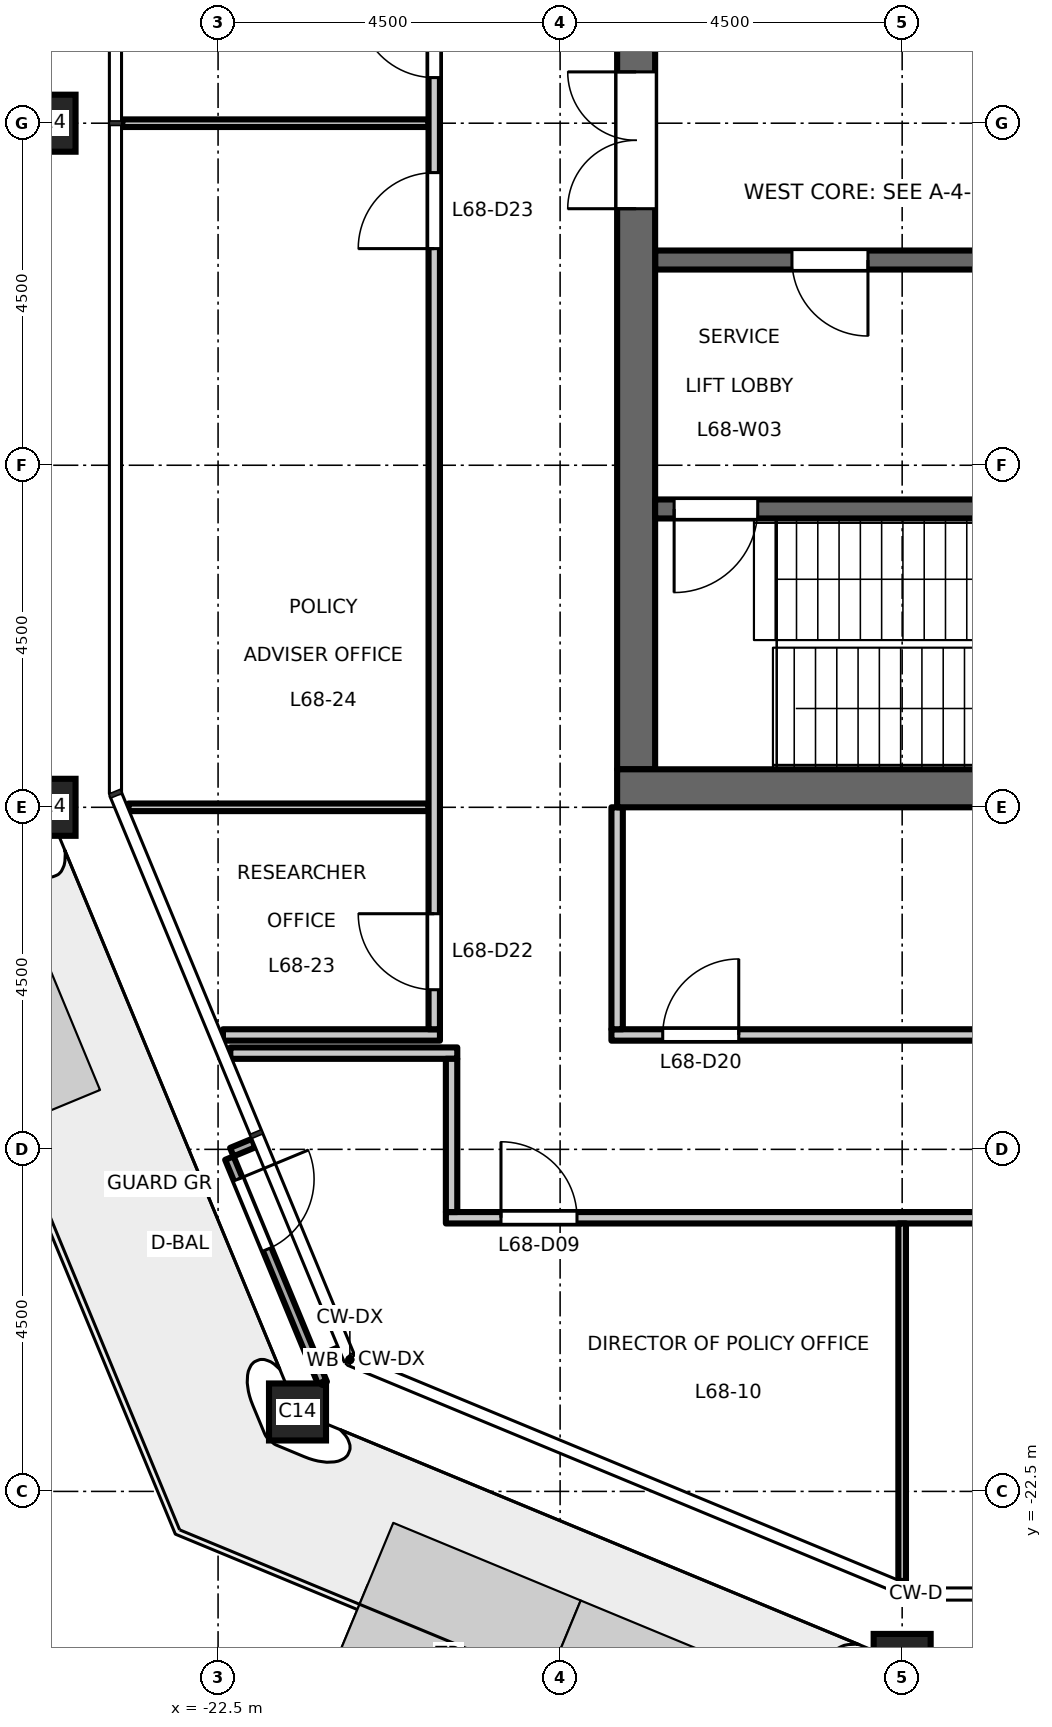
"""IFC4 building model, lengths in metres.
Left out: names, types, materials, properties, quantities, classifications, styles, units other than length and angle.
Written with IfcOpenShell. Run it as: python <this file> out.ifc"""

import sys

from ifc_helpers import new_model, si_unit, direction, frame, frame_2d, origin, origin_2d, place, context, subcontext, project, spatial, rectangle, hollow_rectangle, extrude, element, fill, save


model = new_model("IFC4")
c1 = context("Model", 3, precision=1e-05, world=origin(), true_north=direction((0.0, 1.0)))
c2 = subcontext(c1, "Body", "Model", "MODEL_VIEW")
j1 = project(units=[si_unit("LENGTHUNIT", "METRE"), si_unit("PLANEANGLEUNIT", "RADIAN")], contexts=[c1])
p1 = place(None, origin())
s1 = spatial("IfcSite", under=j1, at=p1, CompositionType="ELEMENT")
p2 = place(p1, origin())
s2 = spatial("IfcBuilding", under=s1, at=p2, CompositionType="ELEMENT")
p3 = place(p2, frame((0.0, 0.0, 316.7)))
s3 = spatial("IfcBuildingStorey", under=s2, at=p3, CompositionType="ELEMENT", Elevation=316.7)
for number, where, z_axis, x_axis in (
    (1, (-13.5, -24.75, 0.0), (0.0, 0.0, 1.0), (1.0, 0.0, 0.0)),
    (2, (-24.75, -4.5, 0.0), (0.0, 0.0, 1.0), (1.0, 0.0, 0.0)),
    (3, (-24.75, -13.5, 0.0), (0.0, 0.0, 1.0), (1.0, 0.0, 0.0)),
    (4, (-21.455, -21.455, 0.0), (0.0, 0.0, 1.0), (1.0, 0.0, 0.0)),
):
    element("IfcColumn", number, at=place(p3, frame(where, z_axis=z_axis, x_axis=x_axis)), inside=s3, PredefinedType="COLUMN", context=c2, shape_type="SweptSolid", body=[
        extrude(hollow_rectangle(XDim=0.75, YDim=0.75, WallThickness=0.04, at=origin_2d()), origin(), (0.0, 0.0, 1.0), 4.5),
    ])
p4 = place(p3, frame((-12.15, -6.3, 0.0), z_axis=(0.0, 0.0, 1.0), x_axis=(-1.0, 0.0, 0.0)))
e5 = element("IfcWall", 5, at=p4, inside=s3, PredefinedType="SHEAR", context=c2, shape_type="SweptSolid", body=[
    extrude(rectangle(XDim=4.6, YDim=0.25, at=frame_2d((2.3, 0.0))), origin(), (0.0, 0.0, 1.0), 4.35),
])
p5 = place(p4, frame((1.8, 0.0, 0.0)))
e6 = element("IfcOpeningElement", 6, at=p5, cuts=e5, PredefinedType="OPENING", context=c2, shape_type="SweptSolid", body=[
    extrude(rectangle(XDim=1.0, YDim=2.1, at=frame_2d((0.5, 1.05))), frame((0.0, 0.135, 0.0), z_axis=(0.0, -1.0, 0.0), x_axis=(1.0, 0.0, 0.0)), (0.0, 0.0, 1.0), 0.27),
])
p6 = place(p3, frame((-17.0, -13.0, 0.0), z_axis=(0.0, 0.0, 1.0), x_axis=(0.0, 1.0, 0.0)))
e7 = element("IfcWall", 7, at=p6, inside=s3, PredefinedType="SHEAR", context=c2, shape_type="SweptSolid", body=[
    extrude(rectangle(XDim=26.0, YDim=0.5, at=frame_2d((13.0, 0.0))), origin(), (0.0, 0.0, 1.0), 4.35),
])
p7 = place(p6, frame((16.825, 0.0, 0.0)))
e8 = element("IfcOpeningElement", 8, at=p7, cuts=e7, PredefinedType="OPENING", context=c2, shape_type="SweptSolid", body=[
    extrude(rectangle(XDim=1.8, YDim=2.1, at=frame_2d((0.9, 1.05))), frame((0.0, 0.26, 0.0), z_axis=(0.0, -1.0, 0.0), x_axis=(1.0, 0.0, 0.0)), (0.0, 0.0, 1.0), 0.52),
])
p8 = place(p6, frame((7.375, 0.0, 0.0)))
e9 = element("IfcOpeningElement", 9, at=p8, cuts=e7, PredefinedType="OPENING", context=c2, shape_type="SweptSolid", body=[
    extrude(rectangle(XDim=1.8, YDim=2.1, at=frame_2d((0.9, 1.05))), frame((0.0, 0.26, 0.0), z_axis=(0.0, -1.0, 0.0), x_axis=(1.0, 0.0, 0.0)), (0.0, 0.0, 1.0), 0.52),
])
p9 = place(p3, frame((-8.75, -9.575, 0.0), z_axis=(0.0, 0.0, 1.0), x_axis=(-1.0, 0.0, 0.0)))
e10 = element("IfcWall", 10, at=p9, inside=s3, PredefinedType="SHEAR", context=c2, shape_type="SweptSolid", body=[
    extrude(rectangle(XDim=8.0, YDim=0.25, at=frame_2d((4.0, 0.0))), origin(), (0.0, 0.0, 1.0), 4.35),
])
p10 = place(p9, frame((6.65, 0.0, 0.0)))
e11 = element("IfcOpeningElement", 11, at=p10, cuts=e10, PredefinedType="OPENING", context=c2, shape_type="SweptSolid", body=[
    extrude(rectangle(XDim=1.1, YDim=2.1, at=frame_2d((0.55, 1.05))), frame((0.0, 0.135, 0.0), z_axis=(0.0, -1.0, 0.0), x_axis=(1.0, 0.0, 0.0)), (0.0, 0.0, 1.0), 0.27),
])
p11 = place(p3, frame((-8.25, -13.25, 0.0), z_axis=(0.0, 0.0, 1.0), x_axis=(-1.0, 0.0, 0.0)))
e12 = element("IfcWall", 12, at=p11, inside=s3, PredefinedType="SHEAR", context=c2, shape_type="SweptSolid", body=[
    extrude(rectangle(XDim=9.0, YDim=0.5, at=frame_2d((4.5, 0.0))), origin(), (0.0, 0.0, 1.0), 4.35),
])
p12 = place(p3, frame((-22.033, -17.917, 0.0), z_axis=(0.0, 0.0, 1.0), x_axis=(-0.923844027884, -0.382769136873, 0.0)))
e13 = element("IfcWall", 13, at=p12, inside=s3, PredefinedType="STANDARD", context=c2, shape_type="SweptSolid", body=[
    extrude(rectangle(XDim=0.31, YDim=0.12, at=frame_2d((0.155, 0.0))), origin(), (0.0, 0.0, 1.0), 4.35),
])
p13 = place(p3, frame((-20.896, -20.66, 0.0), z_axis=(0.0, 0.0, 1.0), x_axis=(-0.923959293734, -0.382490814953, 0.0)))
e14 = element("IfcWall", 14, at=p13, inside=s3, PredefinedType="STANDARD", context=c2, shape_type="SweptSolid", body=[
    extrude(rectangle(XDim=0.31, YDim=0.12, at=frame_2d((0.155, 0.0))), origin(), (0.0, 0.0, 1.0), 4.35),
])
p14 = place(p3, frame((-22.352, -18.115, 0.0), z_axis=(0.0, 0.0, 1.0), x_axis=(0.382680969843, -0.923880552517, 0.0)))
e15 = element("IfcWall", 15, at=p14, inside=s3, PredefinedType="STANDARD", context=c2, shape_type="SweptSolid", body=[
    extrude(rectangle(XDim=3.21, YDim=0.12, at=frame_2d((1.605, 0.0))), origin(), (0.0, 0.0, 1.0), 4.35),
])
p15 = place(p14, frame((0.3, 0.0, 0.0)))
e16 = element("IfcOpeningElement", 16, at=p15, cuts=e15, PredefinedType="OPENING", context=c2, shape_type="SweptSolid", body=[
    extrude(rectangle(XDim=1.0, YDim=2.4, at=frame_2d((0.5, 1.2))), frame((0.0, 0.07, 0.0), z_axis=(0.0, -1.0, 0.0), x_axis=(1.0, 0.0, 0.0)), (0.0, 0.0, 1.0), 0.14),
])
p16 = place(p3, frame((-19.503, -18.9, 0.0), z_axis=(0.0, 0.0, 1.0), x_axis=(1.0, 0.0, 0.0)))
e17 = element("IfcWall", 17, at=p16, inside=s3, PredefinedType="PARTITIONING", context=c2, shape_type="SweptSolid", body=[
    extrude(rectangle(XDim=40.944, YDim=0.15, at=frame_2d((20.472, 0.0))), origin(), (0.0, 0.0, 1.0), 4.35),
])
p17 = place(p16, frame((13.403, 0.0, 0.0)))
e18 = element("IfcOpeningElement", 18, at=p17, cuts=e17, PredefinedType="OPENING", context=c2, shape_type="SweptSolid", body=[
    extrude(rectangle(XDim=1.0, YDim=2.1, at=frame_2d((0.5, 1.05))), frame((0.0, 0.085, 0.0), z_axis=(0.0, -1.0, 0.0), x_axis=(1.0, 0.0, 0.0)), (0.0, 0.0, 1.0), 0.17),
])
p18 = place(p16, frame((15.653, 0.0, 0.0)))
e19 = element("IfcOpeningElement", 19, at=p18, cuts=e17, PredefinedType="OPENING", context=c2, shape_type="SweptSolid", body=[
    extrude(rectangle(XDim=1.0, YDim=2.1, at=frame_2d((0.5, 1.05))), frame((0.0, 0.085, 0.0), z_axis=(0.0, -1.0, 0.0), x_axis=(1.0, 0.0, 0.0)), (0.0, 0.0, 1.0), 0.17),
])
p19 = place(p16, frame((31.403, 0.0, 0.0)))
e20 = element("IfcOpeningElement", 20, at=p19, cuts=e17, PredefinedType="OPENING", context=c2, shape_type="SweptSolid", body=[
    extrude(rectangle(XDim=1.0, YDim=2.1, at=frame_2d((0.5, 1.05))), frame((0.0, 0.085, 0.0), z_axis=(0.0, -1.0, 0.0), x_axis=(1.0, 0.0, 0.0)), (0.0, 0.0, 1.0), 0.17),
])
p20 = place(p16, frame((0.725, 0.0, 0.0)))
e21 = element("IfcOpeningElement", 21, at=p20, cuts=e17, PredefinedType="OPENING", context=c2, shape_type="SweptSolid", body=[
    extrude(rectangle(XDim=1.0, YDim=2.1, at=frame_2d((0.5, 1.05))), frame((0.0, 0.085, 0.0), z_axis=(0.0, -1.0, 0.0), x_axis=(1.0, 0.0, 0.0)), (0.0, 0.0, 1.0), 0.17),
])
p21 = place(p16, frame((39.403, 0.0, 0.0)))
e22 = element("IfcOpeningElement", 22, at=p21, cuts=e17, PredefinedType="OPENING", context=c2, shape_type="SweptSolid", body=[
    extrude(rectangle(XDim=1.0, YDim=2.1, at=frame_2d((0.5, 1.05))), frame((0.0, 0.085, 0.0), z_axis=(0.0, -1.0, 0.0), x_axis=(1.0, 0.0, 0.0)), (0.0, 0.0, 1.0), 0.17),
])
p22 = place(p3, frame((-22.339, -16.734, 0.0), z_axis=(0.0, 0.0, 1.0), x_axis=(1.0, 0.0, 0.0)))
e23 = element("IfcWall", 23, at=p22, inside=s3, PredefinedType="PARTITIONING", context=c2, shape_type="SweptSolid", body=[
    extrude(rectangle(XDim=2.986, YDim=0.15, at=frame_2d((1.493, 0.0))), origin(), (0.0, 0.0, 1.0), 4.35),
])
p23 = place(p3, frame((-22.436, -16.495, 0.0), z_axis=(0.0, 0.0, 1.0), x_axis=(1.0, 0.0, 0.0)))
e24 = element("IfcWall", 24, at=p23, inside=s3, PredefinedType="PARTITIONING", context=c2, shape_type="SweptSolid", body=[
    extrude(rectangle(XDim=2.855, YDim=0.15, at=frame_2d((1.427, 0.0))), origin(), (0.0, 0.0, 1.0), 4.35),
])
p24 = place(p3, frame((-17.325, -16.495, 0.0), z_axis=(0.0, 0.0, 1.0), x_axis=(1.0, 0.0, 0.0)))
e25 = element("IfcWall", 25, at=p24, inside=s3, PredefinedType="PARTITIONING", context=c2, shape_type="SweptSolid", body=[
    extrude(rectangle(XDim=34.65, YDim=0.15, at=frame_2d((17.325, 0.0))), origin(), (0.0, 0.0, 1.0), 4.35),
])
p25 = place(p24, frame((9.675, 0.0, 0.0)))
e26 = element("IfcOpeningElement", 26, at=p25, cuts=e25, PredefinedType="OPENING", context=c2, shape_type="SweptSolid", body=[
    extrude(rectangle(XDim=1.0, YDim=2.1, at=frame_2d((0.5, 1.05))), frame((0.0, 0.085, 0.0), z_axis=(0.0, -1.0, 0.0), x_axis=(1.0, 0.0, 0.0)), (0.0, 0.0, 1.0), 0.17),
])
p26 = place(p24, frame((23.925, 0.0, 0.0)))
e27 = element("IfcOpeningElement", 27, at=p26, cuts=e25, PredefinedType="OPENING", context=c2, shape_type="SweptSolid", body=[
    extrude(rectangle(XDim=1.0, YDim=2.1, at=frame_2d((0.5, 1.05))), frame((0.0, 0.085, 0.0), z_axis=(0.0, -1.0, 0.0), x_axis=(1.0, 0.0, 0.0)), (0.0, 0.0, 1.0), 0.17),
])
p27 = place(p24, frame((0.675, 0.0, 0.0)))
e28 = element("IfcOpeningElement", 28, at=p27, cuts=e25, PredefinedType="OPENING", context=c2, shape_type="SweptSolid", body=[
    extrude(rectangle(XDim=1.0, YDim=2.1, at=frame_2d((0.5, 1.05))), frame((0.0, 0.085, 0.0), z_axis=(0.0, -1.0, 0.0), x_axis=(1.0, 0.0, 0.0)), (0.0, 0.0, 1.0), 0.17),
])
p28 = place(p24, frame((32.925, 0.0, 0.0)))
e29 = element("IfcOpeningElement", 29, at=p28, cuts=e25, PredefinedType="OPENING", context=c2, shape_type="SweptSolid", body=[
    extrude(rectangle(XDim=1.0, YDim=2.1, at=frame_2d((0.5, 1.05))), frame((0.0, 0.085, 0.0), z_axis=(0.0, -1.0, 0.0), x_axis=(1.0, 0.0, 0.0)), (0.0, 0.0, 1.0), 0.17),
])
p29 = place(p3, frame((-23.678, -13.5, 0.0), z_axis=(0.0, 0.0, 1.0), x_axis=(1.0, 0.0, 0.0)))
e30 = element("IfcWall", 30, at=p29, inside=s3, PredefinedType="PARTITIONING", context=c2, shape_type="SweptSolid", body=[
    extrude(rectangle(XDim=3.947, YDim=0.1, at=frame_2d((1.974, 0.0))), origin(), (0.0, 0.0, 1.0), 4.35),
])
p30 = place(p3, frame((-23.76, -4.5, 0.0), z_axis=(0.0, 0.0, 1.0), x_axis=(1.0, 0.0, 0.0)))
e31 = element("IfcWall", 31, at=p30, inside=s3, PredefinedType="PARTITIONING", context=c2, shape_type="SweptSolid", body=[
    extrude(rectangle(XDim=4.029, YDim=0.1, at=frame_2d((2.015, 0.0))), origin(), (0.0, 0.0, 1.0), 4.35),
])
p31 = place(p3, frame((-19.656, -16.42, 0.0), z_axis=(0.0, 0.0, 1.0), x_axis=(0.0, 1.0, 0.0)))
e32 = element("IfcWall", 32, at=p31, inside=s3, PredefinedType="PARTITIONING", context=c2, shape_type="SweptSolid", body=[
    extrude(rectangle(XDim=32.845, YDim=0.15, at=frame_2d((16.422, 0.0))), origin(), (0.0, 0.0, 1.0), 4.35),
])
p32 = place(p31, frame((0.52, 0.0, 0.0)))
e33 = element("IfcOpeningElement", 33, at=p32, cuts=e32, PredefinedType="OPENING", context=c2, shape_type="SweptSolid", body=[
    extrude(rectangle(XDim=1.0, YDim=2.1, at=frame_2d((0.5, 1.05))), frame((0.0, 0.085, 0.0), z_axis=(0.0, -1.0, 0.0), x_axis=(1.0, 0.0, 0.0)), (0.0, 0.0, 1.0), 0.17),
])
p33 = place(p31, frame((10.27, 0.0, 0.0)))
e34 = element("IfcOpeningElement", 34, at=p33, cuts=e32, PredefinedType="OPENING", context=c2, shape_type="SweptSolid", body=[
    extrude(rectangle(XDim=1.0, YDim=2.1, at=frame_2d((0.5, 1.05))), frame((0.0, 0.085, 0.0), z_axis=(0.0, -1.0, 0.0), x_axis=(1.0, 0.0, 0.0)), (0.0, 0.0, 1.0), 0.17),
])
p34 = place(p31, frame((12.52, 0.0, 0.0)))
e35 = element("IfcOpeningElement", 35, at=p34, cuts=e32, PredefinedType="OPENING", context=c2, shape_type="SweptSolid", body=[
    extrude(rectangle(XDim=1.0, YDim=2.1, at=frame_2d((0.5, 1.05))), frame((0.0, 0.085, 0.0), z_axis=(0.0, -1.0, 0.0), x_axis=(1.0, 0.0, 0.0)), (0.0, 0.0, 1.0), 0.17),
])
p35 = place(p3, frame((-19.428, -18.825, 0.0), z_axis=(0.0, 0.0, 1.0), x_axis=(0.0, 1.0, 0.0)))
e36 = element("IfcWall", 36, at=p35, inside=s3, PredefinedType="PARTITIONING", context=c2, shape_type="SweptSolid", body=[
    extrude(rectangle(XDim=2.016, YDim=0.15, at=frame_2d((1.008, 0.0))), origin(), (0.0, 0.0, 1.0), 4.35),
])
p36 = place(p3, frame((-17.25, -16.42, 0.0), z_axis=(0.0, 0.0, 1.0), x_axis=(0.0, 1.0, 0.0)))
e37 = element("IfcWall", 37, at=p36, inside=s3, PredefinedType="PARTITIONING", context=c2, shape_type="SweptSolid", body=[
    extrude(rectangle(XDim=2.92, YDim=0.15, at=frame_2d((1.46, 0.0))), origin(), (0.0, 0.0, 1.0), 4.35),
])
p37 = place(p3, frame((-13.5, -23.678, 0.0), z_axis=(0.0, 0.0, 1.0), x_axis=(0.0, 1.0, 0.0)))
e38 = element("IfcWall", 38, at=p37, inside=s3, PredefinedType="PARTITIONING", context=c2, shape_type="SweptSolid", body=[
    extrude(rectangle(XDim=4.703, YDim=0.1, at=frame_2d((2.352, 0.0))), origin(), (0.0, 0.0, 1.0), 3.75),
])
p38 = place(p5, origin())
e39 = element("IfcDoor", 39, at=p38, inside=s3, OperationType="SINGLE_SWING_RIGHT", PredefinedType="DOOR", context=c2, shape_type="SweptSolid", body=[
    extrude(rectangle(XDim=1.0, YDim=2.1, at=frame_2d((0.5, 1.05))), frame((0.0, 0.025, 0.0), z_axis=(0.0, -1.0, 0.0), x_axis=(1.0, 0.0, 0.0)), (0.0, 0.0, 1.0), 0.05),
])
fill(e6, e39)
p39 = place(p10, origin())
e40 = element("IfcDoor", 40, at=p39, inside=s3, OperationType="SINGLE_SWING_LEFT", PredefinedType="DOOR", context=c2, shape_type="SweptSolid", body=[
    extrude(rectangle(XDim=1.1, YDim=2.1, at=frame_2d((0.55, 1.05))), frame((0.0, 0.025, 0.0), z_axis=(0.0, -1.0, 0.0), x_axis=(1.0, 0.0, 0.0)), (0.0, 0.0, 1.0), 0.05),
])
fill(e11, e40)
p40 = place(p8, origin())
e41 = element("IfcDoor", 41, at=p40, inside=s3, OperationType="DOUBLE_DOOR_DOUBLE_SWING", PredefinedType="DOOR", context=c2, shape_type="SweptSolid", body=[
    extrude(rectangle(XDim=1.8, YDim=2.1, at=frame_2d((0.9, 1.05))), frame((0.0, 0.025, 0.0), z_axis=(0.0, -1.0, 0.0), x_axis=(1.0, 0.0, 0.0)), (0.0, 0.0, 1.0), 0.05),
])
fill(e9, e41)
p41 = place(p15, origin())
e42 = element("IfcDoor", 42, at=p41, inside=s3, OperationType="SINGLE_SWING_LEFT", PredefinedType="DOOR", context=c2, shape_type="SweptSolid", body=[
    extrude(rectangle(XDim=1.0, YDim=2.4, at=frame_2d((0.5, 1.2))), frame((0.0, 0.025, 0.0), z_axis=(0.0, -1.0, 0.0), x_axis=(1.0, 0.0, 0.0)), (0.0, 0.0, 1.0), 0.05),
])
fill(e16, e42)
p42 = place(p20, origin())
e43 = element("IfcDoor", 43, at=p42, inside=s3, OperationType="SINGLE_SWING_LEFT", PredefinedType="DOOR", context=c2, shape_type="SweptSolid", body=[
    extrude(rectangle(XDim=1.0, YDim=2.1, at=frame_2d((0.5, 1.05))), frame((0.0, 0.025, 0.0), z_axis=(0.0, -1.0, 0.0), x_axis=(1.0, 0.0, 0.0)), (0.0, 0.0, 1.0), 0.05),
])
fill(e21, e43)
p43 = place(p27, origin())
e44 = element("IfcDoor", 44, at=p43, inside=s3, OperationType="SINGLE_SWING_RIGHT", PredefinedType="DOOR", context=c2, shape_type="SweptSolid", body=[
    extrude(rectangle(XDim=1.0, YDim=2.1, at=frame_2d((0.5, 1.05))), frame((0.0, 0.025, 0.0), z_axis=(0.0, -1.0, 0.0), x_axis=(1.0, 0.0, 0.0)), (0.0, 0.0, 1.0), 0.05),
])
fill(e28, e44)
p44 = place(p32, origin())
e45 = element("IfcDoor", 45, at=p44, inside=s3, OperationType="SINGLE_SWING_RIGHT", PredefinedType="DOOR", context=c2, shape_type="SweptSolid", body=[
    extrude(rectangle(XDim=1.0, YDim=2.1, at=frame_2d((0.5, 1.05))), frame((0.0, 0.025, 0.0), z_axis=(0.0, -1.0, 0.0), x_axis=(1.0, 0.0, 0.0)), (0.0, 0.0, 1.0), 0.05),
])
fill(e33, e45)
p45 = place(p33, origin())
e46 = element("IfcDoor", 46, at=p45, inside=s3, OperationType="SINGLE_SWING_LEFT", PredefinedType="DOOR", context=c2, shape_type="SweptSolid", body=[
    extrude(rectangle(XDim=1.0, YDim=2.1, at=frame_2d((0.5, 1.05))), frame((0.0, 0.025, 0.0), z_axis=(0.0, -1.0, 0.0), x_axis=(1.0, 0.0, 0.0)), (0.0, 0.0, 1.0), 0.05),
])
fill(e34, e46)
p46 = place(p34, origin())
e47 = element("IfcDoor", 47, at=p46, inside=s3, OperationType="SINGLE_SWING_RIGHT", PredefinedType="DOOR", context=c2, shape_type="SweptSolid", body=[
    extrude(rectangle(XDim=1.0, YDim=2.1, at=frame_2d((0.5, 1.05))), frame((0.0, 0.025, 0.0), z_axis=(0.0, -1.0, 0.0), x_axis=(1.0, 0.0, 0.0)), (0.0, 0.0, 1.0), 0.05),
])
fill(e35, e47)
save(model, sys.argv[1])
